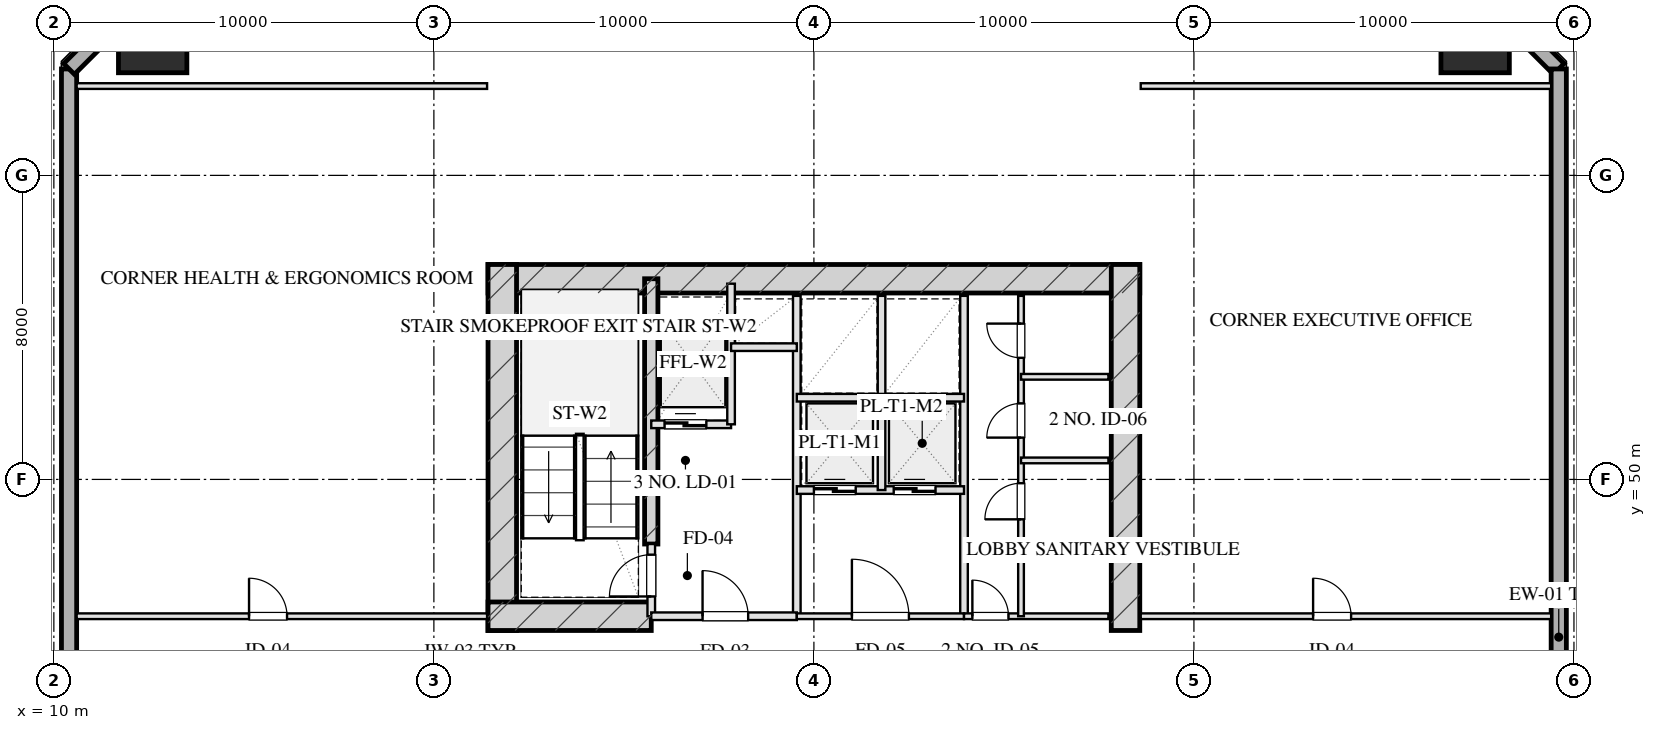
"""IFC4 building model, lengths in metres.
Left out: names, types, materials, properties, quantities, classifications, styles, units other than length and angle.
Written with IfcOpenShell. Run it as: python <this file> out.ifc"""

import sys

from ifc_helpers import new_model, si_unit, direction, frame, frame_2d, origin, origin_2d, place, context, subcontext, project, spatial, rectangle, hollow_rectangle, extrude, element, fill, save


model = new_model("IFC4")
c1 = context("Model", 3, precision=1e-05, world=origin(), true_north=direction((0.0, 1.0)))
c2 = subcontext(c1, "Body", "Model", "MODEL_VIEW")
j1 = project(units=[si_unit("LENGTHUNIT", "METRE"), si_unit("PLANEANGLEUNIT", "RADIAN")], contexts=[c1])
p1 = place(None, origin())
s1 = spatial("IfcSite", under=j1, at=p1, CompositionType="ELEMENT")
p2 = place(p1, origin())
s2 = spatial("IfcBuilding", under=s1, at=p2, CompositionType="ELEMENT")
p3 = place(p2, frame((0.0, 0.0, 88.55)))
s3 = spatial("IfcBuildingStorey", under=s2, at=p3, CompositionType="ELEMENT", Elevation=88.55)
p4 = place(p3, frame((21.425, 55.28, 0.0), z_axis=(0.0, 0.0, 1.0), x_axis=(1.0, 0.0, 0.0)))
e1 = element("IfcWall", 1, at=p4, inside=s3, PredefinedType="SHEAR", context=c2, shape_type="SweptSolid", body=[
    extrude(rectangle(XDim=17.15, YDim=0.75, at=frame_2d((8.575, 0.0))), origin(), (0.0, 0.0, 1.0), 3.45),
])
for number, where, z_axis, x_axis in (
    (2, (21.8, 46.025, 0.0), (0.0, 0.0, 1.0), (0.0, 1.0, 0.0)),
    (3, (38.2, 46.025, 0.0), (0.0, 0.0, 1.0), (0.0, 1.0, 0.0)),
):
    element("IfcWall", number, at=place(p3, frame(where, z_axis=z_axis, x_axis=x_axis)), inside=s3, PredefinedType="SHEAR", context=c2, shape_type="SweptSolid", body=[
        extrude(rectangle(XDim=9.63, YDim=0.75, at=frame_2d((4.815, 0.0))), origin(), (0.0, 0.0, 1.0), 3.45),
    ])
p5 = place(p3, frame((25.72, 48.3, 0.0), z_axis=(0.0, 0.0, 1.0), x_axis=(0.0, 1.0, 0.0)))
e4 = element("IfcWall", 4, at=p5, inside=s3, PredefinedType="SHEAR", context=c2, shape_type="SweptSolid", body=[
    extrude(rectangle(XDim=6.98, YDim=0.35, at=frame_2d((3.49, 0.0))), origin(), (0.0, 0.0, 1.0), 3.45),
])
p6 = place(p3, frame((21.425, 46.4, 0.0), z_axis=(0.0, 0.0, 1.0), x_axis=(1.0, 0.0, 0.0)))
e5 = element("IfcWall", 5, at=p6, inside=s3, PredefinedType="SHEAR", context=c2, shape_type="SweptSolid", body=[
    extrude(rectangle(XDim=4.295, YDim=0.75, at=frame_2d((2.147, 0.0))), origin(), (0.0, 0.0, 1.0), 3.45),
])
for number, where, z_axis, x_axis in (
    (6, (47.4, 61.6, 0.0), (0.0, 0.0, 1.0), (1.0, 0.0, 0.0)),
    (7, (12.6, 61.6, 0.0), (0.0, 0.0, 1.0), (1.0, 0.0, 0.0)),
):
    element("IfcColumn", number, at=place(p3, frame(where, z_axis=z_axis, x_axis=x_axis)), inside=s3, PredefinedType="COLUMN", context=c2, shape_type="SweptSolid", body=[
        extrude(hollow_rectangle(XDim=1.8, YDim=1.8, WallThickness=0.06, at=origin_2d()), origin(), (0.0, 0.0, 1.0), 3.451),
    ])
p7 = place(p3, frame((10.4, 7.2, 0.0), z_axis=(0.0, 0.0, 1.0), x_axis=(0.0, 1.0, 0.0)))
e8 = element("IfcWall", 8, at=p7, inside=s3, PredefinedType="SOLIDWALL", context=c2, shape_type="SweptSolid", body=[
    extrude(rectangle(XDim=53.6, YDim=0.4, at=frame_2d((26.8, 0.0))), origin(), (0.0, 0.0, 1.0), 2.55),
])
p8 = place(p7, frame((21.85, 0.0, 0.0)))
e9 = element("IfcOpeningElement", 9, at=p8, cuts=e8, PredefinedType="OPENING", context=c2, shape_type="SweptSolid", body=[
    extrude(rectangle(XDim=1.1, YDim=2.15, at=frame_2d((0.55, 1.075))), frame((0.0, 0.21, 0.0), z_axis=(0.0, -1.0, 0.0), x_axis=(1.0, 0.0, 0.0)), (0.0, 0.0, 1.0), 0.42),
])
for number, where, z_axis, x_axis in (
    (10, (10.4, 60.8, 0.0), (0.0, 0.0, 1.0), (0.707, 0.707, 0.0)),
    (11, (46.6, 63.8, 0.0), (0.0, 0.0, 1.0), (0.707, -0.707, 0.0)),
):
    element("IfcWall", number, at=place(p3, frame(where, z_axis=z_axis, x_axis=x_axis)), inside=s3, PredefinedType="SOLIDWALL", context=c2, shape_type="SweptSolid", body=[
        extrude(rectangle(XDim=4.243, YDim=0.4, at=frame_2d((2.121, 0.0))), origin(), (0.0, 0.0, 1.0), 2.55),
    ])
p9 = place(p3, frame((49.6, 60.8, 0.0), z_axis=(0.0, 0.0, 1.0), x_axis=(0.0, -1.0, 0.0)))
e12 = element("IfcWall", 12, at=p9, inside=s3, PredefinedType="SOLIDWALL", context=c2, shape_type="SweptSolid", body=[
    extrude(rectangle(XDim=53.6, YDim=0.4, at=frame_2d((26.8, 0.0))), origin(), (0.0, 0.0, 1.0), 2.55),
])
p10 = place(p9, frame((23.0, 0.0, 0.75)))
e13 = element("IfcOpeningElement", 13, at=p10, cuts=e12, PredefinedType="OPENING", context=c2, shape_type="SweptSolid", body=[
    extrude(rectangle(XDim=2.4, YDim=1.4, at=frame_2d((1.2, 0.7))), frame((0.0, 0.21, 0.0), z_axis=(0.0, -1.0, 0.0), x_axis=(1.0, 0.0, 0.0)), (0.0, 0.0, 1.0), 0.42),
])
p11 = place(p9, frame((30.65, 0.0, 0.0)))
e14 = element("IfcOpeningElement", 14, at=p11, cuts=e12, PredefinedType="OPENING", context=c2, shape_type="SweptSolid", body=[
    extrude(rectangle(XDim=1.1, YDim=2.15, at=frame_2d((0.55, 1.075))), frame((0.0, 0.21, 0.0), z_axis=(0.0, -1.0, 0.0), x_axis=(1.0, 0.0, 0.0)), (0.0, 0.0, 1.0), 0.42),
])
p12 = place(p3, frame((25.72, 46.4, 0.0), z_axis=(0.0, 0.0, 1.0), x_axis=(0.0, 1.0, 0.0)))
e15 = element("IfcWall", 15, at=p12, inside=s3, PredefinedType="PARTITIONING", context=c2, shape_type="SweptSolid", body=[
    extrude(rectangle(XDim=1.9, YDim=0.2, at=frame_2d((0.95, 0.0))), origin(), (0.0, 0.0, 1.0), 3.155),
])
p13 = place(p12, frame((0.52, 0.0, 0.0)))
e16 = element("IfcOpeningElement", 16, at=p13, cuts=e15, PredefinedType="OPENING", context=c2, shape_type="SweptSolid", body=[
    extrude(rectangle(XDim=1.1, YDim=2.05, at=frame_2d((0.55, 1.025))), frame((0.0, 0.11, 0.0), z_axis=(0.0, -1.0, 0.0), x_axis=(1.0, 0.0, 0.0)), (0.0, 0.0, 1.0), 0.22),
])
p14 = place(p3, frame((29.55, 46.4, 0.0), z_axis=(0.0, 0.0, 1.0), x_axis=(0.0, 1.0, 0.0)))
e17 = element("IfcWall", 17, at=p14, inside=s3, PredefinedType="PARTITIONING", context=c2, shape_type="SweptSolid", body=[
    extrude(rectangle(XDim=8.43, YDim=0.2, at=frame_2d((4.215, 0.0))), origin(), (0.0, 0.0, 1.0), 3.155),
])
p15 = place(p3, frame((25.72, 46.4, 0.0), z_axis=(0.0, 0.0, 1.0), x_axis=(1.0, 0.0, 0.0)))
e18 = element("IfcWall", 18, at=p15, inside=s3, PredefinedType="PARTITIONING", context=c2, shape_type="SweptSolid", body=[
    extrude(rectangle(XDim=3.83, YDim=0.2, at=frame_2d((1.915, 0.0))), origin(), (0.0, 0.0, 1.0), 3.155),
])
p16 = place(p15, frame((1.35, 0.0, 0.0)))
e19 = element("IfcOpeningElement", 19, at=p16, cuts=e18, PredefinedType="OPENING", context=c2, shape_type="SweptSolid", body=[
    extrude(rectangle(XDim=1.2, YDim=2.05, at=frame_2d((0.6, 1.025))), frame((0.0, 0.11, 0.0), z_axis=(0.0, -1.0, 0.0), x_axis=(1.0, 0.0, 0.0)), (0.0, 0.0, 1.0), 0.22),
])
p17 = place(p3, frame((25.72, 51.45, 0.0), z_axis=(0.0, 0.0, 1.0), x_axis=(1.0, 0.0, 0.0)))
e20 = element("IfcWall", 20, at=p17, inside=s3, PredefinedType="PARTITIONING", context=c2, shape_type="SweptSolid", body=[
    extrude(rectangle(XDim=2.1, YDim=0.2, at=frame_2d((1.05, 0.0))), origin(), (0.0, 0.0, 1.0), 3.155),
])
p18 = place(p17, frame((0.35, 0.0, 0.0)))
e21 = element("IfcOpeningElement", 21, at=p18, cuts=e20, PredefinedType="OPENING", context=c2, shape_type="SweptSolid", body=[
    extrude(rectangle(XDim=1.1, YDim=2.05, at=frame_2d((0.55, 1.025))), frame((0.0, 0.11, 0.0), z_axis=(0.0, -1.0, 0.0), x_axis=(1.0, 0.0, 0.0)), (0.0, 0.0, 1.0), 0.22),
])
p19 = place(p3, frame((27.82, 51.45, 0.0), z_axis=(0.0, 0.0, 1.0), x_axis=(0.0, 1.0, 0.0)))
e22 = element("IfcWall", 22, at=p19, inside=s3, PredefinedType="PARTITIONING", context=c2, shape_type="SweptSolid", body=[
    extrude(rectangle(XDim=3.7, YDim=0.2, at=frame_2d((1.85, 0.0))), origin(), (0.0, 0.0, 1.0), 3.155),
])
p20 = place(p3, frame((27.82, 53.48, 0.0), z_axis=(0.0, 0.0, 1.0), x_axis=(1.0, 0.0, 0.0)))
e23 = element("IfcWall", 23, at=p20, inside=s3, PredefinedType="PARTITIONING", context=c2, shape_type="SweptSolid", body=[
    extrude(rectangle(XDim=1.73, YDim=0.2, at=frame_2d((0.865, 0.0))), origin(), (0.0, 0.0, 1.0), 3.155),
])
p21 = place(p3, frame((33.95, 46.4, 0.0), z_axis=(0.0, 0.0, 1.0), x_axis=(0.0, 1.0, 0.0)))
e24 = element("IfcWall", 24, at=p21, inside=s3, PredefinedType="PARTITIONING", context=c2, shape_type="SweptSolid", body=[
    extrude(rectangle(XDim=8.43, YDim=0.2, at=frame_2d((4.215, 0.0))), origin(), (0.0, 0.0, 1.0), 3.155),
])
p22 = place(p3, frame((29.55, 46.4, 0.0), z_axis=(0.0, 0.0, 1.0), x_axis=(1.0, 0.0, 0.0)))
e25 = element("IfcWall", 25, at=p22, inside=s3, PredefinedType="PARTITIONING", context=c2, shape_type="SweptSolid", body=[
    extrude(rectangle(XDim=4.4, YDim=0.15, at=frame_2d((2.2, 0.0))), origin(), (0.0, 0.0, 1.0), 3.155),
])
p23 = place(p22, frame((1.45, 0.0, 0.0)))
e26 = element("IfcOpeningElement", 26, at=p23, cuts=e25, PredefinedType="OPENING", context=c2, shape_type="SweptSolid", body=[
    extrude(rectangle(XDim=1.5, YDim=2.05, at=frame_2d((0.75, 1.025))), frame((0.0, 0.085, 0.0), z_axis=(0.0, -1.0, 0.0), x_axis=(1.0, 0.0, 0.0)), (0.0, 0.0, 1.0), 0.17),
])
p24 = place(p3, frame((29.55, 49.72, 0.0), z_axis=(0.0, 0.0, 1.0), x_axis=(1.0, 0.0, 0.0)))
e27 = element("IfcWall", 27, at=p24, inside=s3, PredefinedType="PARTITIONING", context=c2, shape_type="SweptSolid", body=[
    extrude(rectangle(XDim=4.4, YDim=0.2, at=frame_2d((2.2, 0.0))), origin(), (0.0, 0.0, 1.0), 3.155),
])
p25 = place(p24, frame((0.45, 0.0, 0.0)))
e28 = element("IfcOpeningElement", 28, at=p25, cuts=e27, PredefinedType="OPENING", context=c2, shape_type="SweptSolid", body=[
    extrude(rectangle(XDim=1.1, YDim=2.05, at=frame_2d((0.55, 1.025))), frame((0.0, 0.11, 0.0), z_axis=(0.0, -1.0, 0.0), x_axis=(1.0, 0.0, 0.0)), (0.0, 0.0, 1.0), 0.22),
])
p26 = place(p24, frame((2.55, 0.0, 0.0)))
e29 = element("IfcOpeningElement", 29, at=p26, cuts=e27, PredefinedType="OPENING", context=c2, shape_type="SweptSolid", body=[
    extrude(rectangle(XDim=1.1, YDim=2.05, at=frame_2d((0.55, 1.025))), frame((0.0, 0.11, 0.0), z_axis=(0.0, -1.0, 0.0), x_axis=(1.0, 0.0, 0.0)), (0.0, 0.0, 1.0), 0.22),
])
p27 = place(p3, frame((31.78, 49.72, 0.0), z_axis=(0.0, 0.0, 1.0), x_axis=(0.0, 1.0, 0.0)))
e30 = element("IfcWall", 30, at=p27, inside=s3, PredefinedType="PARTITIONING", context=c2, shape_type="SweptSolid", body=[
    extrude(rectangle(XDim=5.11, YDim=0.2, at=frame_2d((2.555, 0.0))), origin(), (0.0, 0.0, 1.0), 3.155),
])
p28 = place(p3, frame((29.55, 52.15, 0.0), z_axis=(0.0, 0.0, 1.0), x_axis=(1.0, 0.0, 0.0)))
e31 = element("IfcWall", 31, at=p28, inside=s3, PredefinedType="PARTITIONING", context=c2, shape_type="SweptSolid", body=[
    extrude(rectangle(XDim=4.4, YDim=0.2, at=frame_2d((2.2, 0.0))), origin(), (0.0, 0.0, 1.0), 3.155),
])
p29 = place(p3, frame((33.95, 46.4, 0.0), z_axis=(0.0, 0.0, 1.0), x_axis=(1.0, 0.0, 0.0)))
e32 = element("IfcWall", 32, at=p29, inside=s3, PredefinedType="PARTITIONING", context=c2, shape_type="SweptSolid", body=[
    extrude(rectangle(XDim=3.8, YDim=0.15, at=frame_2d((1.9, 0.0))), origin(), (0.0, 0.0, 1.0), 3.155),
])
p30 = place(p29, frame((0.22, 0.0, 0.0)))
e33 = element("IfcOpeningElement", 33, at=p30, cuts=e32, PredefinedType="OPENING", context=c2, shape_type="SweptSolid", body=[
    extrude(rectangle(XDim=0.95, YDim=2.05, at=frame_2d((0.475, 1.025))), frame((0.0, 0.085, 0.0), z_axis=(0.0, -1.0, 0.0), x_axis=(1.0, 0.0, 0.0)), (0.0, 0.0, 1.0), 0.17),
])
p31 = place(p3, frame((35.45, 46.4, 0.0), z_axis=(0.0, 0.0, 1.0), x_axis=(0.0, 1.0, 0.0)))
e34 = element("IfcWall", 34, at=p31, inside=s3, PredefinedType="PARTITIONING", context=c2, shape_type="SweptSolid", body=[
    extrude(rectangle(XDim=8.43, YDim=0.15, at=frame_2d((4.215, 0.0))), origin(), (0.0, 0.0, 1.0), 2.745),
])
p32 = place(p31, frame((2.55, 0.0, 0.0)))
e35 = element("IfcOpeningElement", 35, at=p32, cuts=e34, PredefinedType="OPENING", context=c2, shape_type="SweptSolid", body=[
    extrude(rectangle(XDim=0.95, YDim=2.05, at=frame_2d((0.475, 1.025))), frame((0.0, 0.085, 0.0), z_axis=(0.0, -1.0, 0.0), x_axis=(1.0, 0.0, 0.0)), (0.0, 0.0, 1.0), 0.17),
])
p33 = place(p31, frame((4.7, 0.0, 0.0)))
e36 = element("IfcOpeningElement", 36, at=p33, cuts=e34, PredefinedType="OPENING", context=c2, shape_type="SweptSolid", body=[
    extrude(rectangle(XDim=0.9, YDim=2.05, at=frame_2d((0.45, 1.025))), frame((0.0, 0.085, 0.0), z_axis=(0.0, -1.0, 0.0), x_axis=(1.0, 0.0, 0.0)), (0.0, 0.0, 1.0), 0.17),
])
p34 = place(p31, frame((6.8, 0.0, 0.0)))
e37 = element("IfcOpeningElement", 37, at=p34, cuts=e34, PredefinedType="OPENING", context=c2, shape_type="SweptSolid", body=[
    extrude(rectangle(XDim=0.9, YDim=2.05, at=frame_2d((0.45, 1.025))), frame((0.0, 0.085, 0.0), z_axis=(0.0, -1.0, 0.0), x_axis=(1.0, 0.0, 0.0)), (0.0, 0.0, 1.0), 0.17),
])
for number, where, z_axis, x_axis in (
    (38, (35.45, 50.5, 0.0), (0.0, 0.0, 1.0), (1.0, 0.0, 0.0)),
    (39, (35.45, 52.7, 0.0), (0.0, 0.0, 1.0), (1.0, 0.0, 0.0)),
):
    element("IfcWall", number, at=place(p3, frame(where, z_axis=z_axis, x_axis=x_axis)), inside=s3, PredefinedType="PARTITIONING", context=c2, shape_type="SweptSolid", body=[
        extrude(rectangle(XDim=2.3, YDim=0.15, at=frame_2d((1.15, 0.0))), origin(), (0.0, 0.0, 1.0), 3.155),
    ])
p35 = place(p3, frame((10.6, 60.35, 0.0), z_axis=(0.0, 0.0, 1.0), x_axis=(1.0, 0.0, 0.0)))
e40 = element("IfcWall", 40, at=p35, inside=s3, PredefinedType="PARTITIONING", context=c2, shape_type="SweptSolid", body=[
    extrude(rectangle(XDim=10.8, YDim=0.15, at=frame_2d((5.4, 0.0))), origin(), (0.0, 0.0, 1.0), 3.155),
])
p36 = place(p3, frame((10.6, 46.4, 0.0), z_axis=(0.0, 0.0, 1.0), x_axis=(1.0, 0.0, 0.0)))
e41 = element("IfcWall", 41, at=p36, inside=s3, PredefinedType="PARTITIONING", context=c2, shape_type="SweptSolid", body=[
    extrude(rectangle(XDim=10.8, YDim=0.15, at=frame_2d((5.4, 0.0))), origin(), (0.0, 0.0, 1.0), 2.15),
])
p37 = place(p36, frame((4.536, 0.0, 0.0)))
e42 = element("IfcOpeningElement", 42, at=p37, cuts=e41, PredefinedType="OPENING", context=c2, shape_type="SweptSolid", body=[
    extrude(rectangle(XDim=1.0, YDim=2.05, at=frame_2d((0.5, 1.025))), frame((0.0, 0.085, 0.0), z_axis=(0.0, -1.0, 0.0), x_axis=(1.0, 0.0, 0.0)), (0.0, 0.0, 1.0), 0.17),
])
p38 = place(p3, frame((38.6, 60.35, 0.0), z_axis=(0.0, 0.0, 1.0), x_axis=(1.0, 0.0, 0.0)))
e43 = element("IfcWall", 43, at=p38, inside=s3, PredefinedType="PARTITIONING", context=c2, shape_type="SweptSolid", body=[
    extrude(rectangle(XDim=10.8, YDim=0.15, at=frame_2d((5.4, 0.0))), origin(), (0.0, 0.0, 1.0), 3.155),
])
p39 = place(p3, frame((38.6, 46.4, 0.0), z_axis=(0.0, 0.0, 1.0), x_axis=(1.0, 0.0, 0.0)))
e44 = element("IfcWall", 44, at=p39, inside=s3, PredefinedType="PARTITIONING", context=c2, shape_type="SweptSolid", body=[
    extrude(rectangle(XDim=10.8, YDim=0.15, at=frame_2d((5.4, 0.0))), origin(), (0.0, 0.0, 1.0), 2.15),
])
p40 = place(p39, frame((4.536, 0.0, 0.0)))
e45 = element("IfcOpeningElement", 45, at=p40, cuts=e44, PredefinedType="OPENING", context=c2, shape_type="SweptSolid", body=[
    extrude(rectangle(XDim=1.0, YDim=2.05, at=frame_2d((0.5, 1.025))), frame((0.0, 0.085, 0.0), z_axis=(0.0, -1.0, 0.0), x_axis=(1.0, 0.0, 0.0)), (0.0, 0.0, 1.0), 0.17),
])
p41 = place(p13, origin())
e46 = element("IfcDoor", 46, at=p41, inside=s3, OperationType="SINGLE_SWING_LEFT", PredefinedType="DOOR", context=c2, shape_type="SweptSolid", body=[
    extrude(rectangle(XDim=1.1, YDim=2.05, at=frame_2d((0.55, 1.025))), frame((0.0, 0.025, 0.0), z_axis=(0.0, -1.0, 0.0), x_axis=(1.0, 0.0, 0.0)), (0.0, 0.0, 1.0), 0.05),
])
fill(e16, e46)
p42 = place(p16, origin())
e47 = element("IfcDoor", 47, at=p42, inside=s3, OperationType="SINGLE_SWING_LEFT", PredefinedType="DOOR", context=c2, shape_type="SweptSolid", body=[
    extrude(rectangle(XDim=1.2, YDim=2.05, at=frame_2d((0.6, 1.025))), frame((0.0, 0.025, 0.0), z_axis=(0.0, -1.0, 0.0), x_axis=(1.0, 0.0, 0.0)), (0.0, 0.0, 1.0), 0.05),
])
fill(e19, e47)
p43 = place(p18, origin())
e48 = element("IfcDoor", 48, at=p43, inside=s3, OperationType="DOUBLE_DOOR_SLIDING", PredefinedType="DOOR", context=c2, shape_type="SweptSolid", body=[
    extrude(rectangle(XDim=1.1, YDim=2.05, at=frame_2d((0.55, 1.025))), frame((0.0, 0.025, 0.0), z_axis=(0.0, -1.0, 0.0), x_axis=(1.0, 0.0, 0.0)), (0.0, 0.0, 1.0), 0.05),
])
fill(e21, e48)
p44 = place(p23, origin())
e49 = element("IfcDoor", 49, at=p44, inside=s3, OperationType="SINGLE_SWING_LEFT", PredefinedType="DOOR", context=c2, shape_type="SweptSolid", body=[
    extrude(rectangle(XDim=1.5, YDim=2.05, at=frame_2d((0.75, 1.025))), frame((0.0, 0.025, 0.0), z_axis=(0.0, -1.0, 0.0), x_axis=(1.0, 0.0, 0.0)), (0.0, 0.0, 1.0), 0.05),
])
fill(e26, e49)
p45 = place(p25, origin())
e50 = element("IfcDoor", 50, at=p45, inside=s3, OperationType="DOUBLE_DOOR_SLIDING", PredefinedType="DOOR", context=c2, shape_type="SweptSolid", body=[
    extrude(rectangle(XDim=1.1, YDim=2.05, at=frame_2d((0.55, 1.025))), frame((0.0, 0.025, 0.0), z_axis=(0.0, -1.0, 0.0), x_axis=(1.0, 0.0, 0.0)), (0.0, 0.0, 1.0), 0.05),
])
fill(e28, e50)
p46 = place(p26, origin())
e51 = element("IfcDoor", 51, at=p46, inside=s3, OperationType="DOUBLE_DOOR_SLIDING", PredefinedType="DOOR", context=c2, shape_type="SweptSolid", body=[
    extrude(rectangle(XDim=1.1, YDim=2.05, at=frame_2d((0.55, 1.025))), frame((0.0, 0.025, 0.0), z_axis=(0.0, -1.0, 0.0), x_axis=(1.0, 0.0, 0.0)), (0.0, 0.0, 1.0), 0.05),
])
fill(e29, e51)
p47 = place(p30, origin())
e52 = element("IfcDoor", 52, at=p47, inside=s3, OperationType="SINGLE_SWING_LEFT", PredefinedType="DOOR", context=c2, shape_type="SweptSolid", body=[
    extrude(rectangle(XDim=0.95, YDim=2.05, at=frame_2d((0.475, 1.025))), frame((0.0, 0.025, 0.0), z_axis=(0.0, -1.0, 0.0), x_axis=(1.0, 0.0, 0.0)), (0.0, 0.0, 1.0), 0.05),
])
fill(e33, e52)
p48 = place(p32, origin())
e53 = element("IfcDoor", 53, at=p48, inside=s3, OperationType="SINGLE_SWING_LEFT", PredefinedType="DOOR", context=c2, shape_type="SweptSolid", body=[
    extrude(rectangle(XDim=0.95, YDim=2.05, at=frame_2d((0.475, 1.025))), frame((0.0, 0.025, 0.0), z_axis=(0.0, -1.0, 0.0), x_axis=(1.0, 0.0, 0.0)), (0.0, 0.0, 1.0), 0.05),
])
fill(e35, e53)
p49 = place(p33, origin())
e54 = element("IfcDoor", 54, at=p49, inside=s3, OperationType="SINGLE_SWING_LEFT", PredefinedType="DOOR", context=c2, shape_type="SweptSolid", body=[
    extrude(rectangle(XDim=0.9, YDim=2.05, at=frame_2d((0.45, 1.025))), frame((0.0, 0.025, 0.0), z_axis=(0.0, -1.0, 0.0), x_axis=(1.0, 0.0, 0.0)), (0.0, 0.0, 1.0), 0.05),
])
fill(e36, e54)
p50 = place(p34, origin())
e55 = element("IfcDoor", 55, at=p50, inside=s3, OperationType="SINGLE_SWING_RIGHT", PredefinedType="DOOR", context=c2, shape_type="SweptSolid", body=[
    extrude(rectangle(XDim=0.9, YDim=2.05, at=frame_2d((0.45, 1.025))), frame((0.0, 0.025, 0.0), z_axis=(0.0, -1.0, 0.0), x_axis=(1.0, 0.0, 0.0)), (0.0, 0.0, 1.0), 0.05),
])
fill(e37, e55)
p51 = place(p37, origin())
e56 = element("IfcDoor", 56, at=p51, inside=s3, OperationType="SINGLE_SWING_LEFT", PredefinedType="DOOR", context=c2, shape_type="SweptSolid", body=[
    extrude(rectangle(XDim=1.0, YDim=2.05, at=frame_2d((0.5, 1.025))), frame((0.0, 0.025, 0.0), z_axis=(0.0, -1.0, 0.0), x_axis=(1.0, 0.0, 0.0)), (0.0, 0.0, 1.0), 0.05),
])
fill(e42, e56)
p52 = place(p40, origin())
e57 = element("IfcDoor", 57, at=p52, inside=s3, OperationType="SINGLE_SWING_LEFT", PredefinedType="DOOR", context=c2, shape_type="SweptSolid", body=[
    extrude(rectangle(XDim=1.0, YDim=2.05, at=frame_2d((0.5, 1.025))), frame((0.0, 0.025, 0.0), z_axis=(0.0, -1.0, 0.0), x_axis=(1.0, 0.0, 0.0)), (0.0, 0.0, 1.0), 0.05),
])
fill(e45, e57)
save(model, sys.argv[1])
